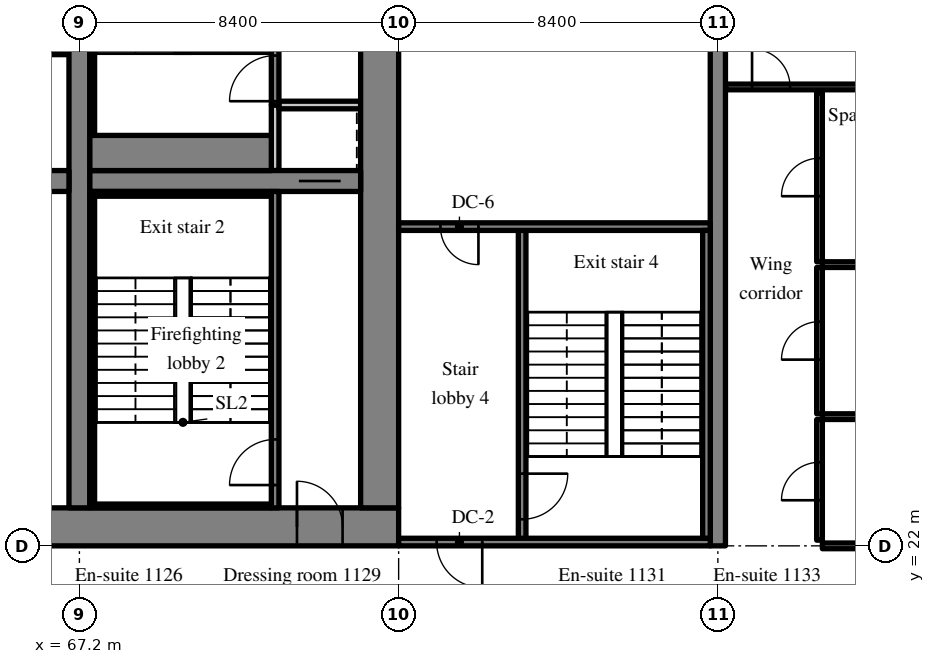
"""IFC4 building model, lengths in metres.
Left out: names, types, materials, properties, quantities, classifications, styles, units other than length and angle.
Written with IfcOpenShell. Run it as: python <this file> out.ifc"""

import sys

from ifc_helpers import new_model, si_unit, direction, frame, frame_2d, origin, place, context, subcontext, project, spatial, rectangle, extrude, source, transform, mapped, element, fill, save


model = new_model("IFC4")
c1 = context("Model", 3, precision=1e-05, world=origin(), true_north=direction((0.0, 1.0)))
c2 = subcontext(c1, "Body", "Model", "MODEL_VIEW")
j1 = project(units=[si_unit("LENGTHUNIT", "METRE"), si_unit("PLANEANGLEUNIT", "RADIAN")], contexts=[c1])
p1 = place(None, origin())
s1 = spatial("IfcSite", under=j1, at=p1, CompositionType="ELEMENT")
p2 = place(p1, origin())
s2 = spatial("IfcBuilding", under=s1, at=p2, CompositionType="ELEMENT")
p3 = place(p2, frame((0.0, 0.0, 50.6)))
s3 = spatial("IfcBuildingStorey", under=s2, at=p3, CompositionType="ELEMENT", Elevation=50.6)
m1 = source(origin(), c2, "Body", "SweptSolid", [
    extrude(rectangle(XDim=50.4, YDim=1.0, at=frame_2d((25.2, 0.0))), origin(), (0.0, 0.0, 1.0), 3.52),
])
p4 = place(p3, frame((25.2, 22.5, 0.0), z_axis=(0.0, 0.0, 1.0), x_axis=(1.0, 0.0, 0.0)))
e1 = element("IfcWall", 1, at=p4, inside=s3, PredefinedType="SHEAR", context=c2, shape_type="MappedRepresentation", body=[
    mapped(m1, transform((0.0, 0.0, 0.0), scale=1.0)),
])
m2 = source(origin(), c2, "Body", "SweptSolid", [
    extrude(rectangle(XDim=1.8, YDim=2.1, at=frame_2d((0.9, 1.05))), frame((0.0, 0.51, 0.0), z_axis=(0.0, -1.0, 0.0), x_axis=(1.0, 0.0, 0.0)), (0.0, 0.0, 1.0), 1.02),
])
p5 = place(p4, frame((15.9, 0.0, 0.0)))
e2 = element("IfcOpeningElement", 2, at=p5, cuts=e1, PredefinedType="OPENING", context=c2, shape_type="MappedRepresentation", body=[
    mapped(m2, transform((0.0, 0.0, 0.0), scale=1.0)),
])
m3 = source(origin(), c2, "Body", "SweptSolid", [
    extrude(rectangle(XDim=1.2, YDim=2.1, at=frame_2d((0.6, 1.05))), frame((0.0, 0.51, 0.0), z_axis=(0.0, -1.0, 0.0), x_axis=(1.0, 0.0, 0.0)), (0.0, 0.0, 1.0), 1.02),
])
p6 = place(p4, frame((26.987, 0.0, 0.0)))
e3 = element("IfcOpeningElement", 3, at=p6, cuts=e1, PredefinedType="OPENING", context=c2, shape_type="MappedRepresentation", body=[
    mapped(m3, transform((0.0, 0.0, 0.0), scale=1.0)),
])
m4 = source(origin(), c2, "Body", "SweptSolid", [
    extrude(rectangle(XDim=0.9, YDim=2.1, at=frame_2d((0.45, 1.05))), frame((0.0, 0.51, 0.0), z_axis=(0.0, -1.0, 0.0), x_axis=(1.0, 0.0, 0.0)), (0.0, 0.0, 1.0), 1.02),
])
p7 = place(p4, frame((33.75, 0.0, 0.0)))
e4 = element("IfcOpeningElement", 4, at=p7, cuts=e1, PredefinedType="OPENING", context=c2, shape_type="MappedRepresentation", body=[
    mapped(m4, transform((0.0, 0.0, 0.0), scale=1.0)),
])
p8 = place(p4, frame((30.75, 0.0, 0.0)))
e5 = element("IfcOpeningElement", 5, at=p8, cuts=e1, PredefinedType="OPENING", context=c2, shape_type="MappedRepresentation", body=[
    mapped(m4, transform((0.0, 0.0, 0.0), scale=1.0)),
])
p9 = place(p4, frame((38.262, 0.0, 0.0)))
e6 = element("IfcOpeningElement", 6, at=p9, cuts=e1, PredefinedType="OPENING", context=c2, shape_type="MappedRepresentation", body=[
    mapped(m4, transform((0.0, 0.0, 0.0), scale=1.0)),
])
p10 = place(p4, frame((6.438, 0.0, 0.0)))
e7 = element("IfcOpeningElement", 7, at=p10, cuts=e1, PredefinedType="OPENING", context=c2, shape_type="MappedRepresentation", body=[
    mapped(m3, transform((0.0, 0.0, 0.0), scale=1.0)),
])
p11 = place(p4, frame((47.725, 0.0, 0.0)))
e8 = element("IfcOpeningElement", 8, at=p11, cuts=e1, PredefinedType="OPENING", context=c2, shape_type="MappedRepresentation", body=[
    mapped(m3, transform((0.0, 0.0, 0.0), scale=1.0)),
])
m5 = source(origin(), c2, "Body", "SweptSolid", [
    extrude(rectangle(XDim=18.0, YDim=1.0, at=frame_2d((9.0, 0.0))), origin(), (0.0, 0.0, 1.0), 3.52),
])
p12 = place(p3, frame((75.1, 23.0, 0.0), z_axis=(0.0, 0.0, 1.0), x_axis=(0.0, 1.0, 0.0)))
e9 = element("IfcWall", 9, at=p12, inside=s3, PredefinedType="SHEAR", context=c2, shape_type="MappedRepresentation", body=[
    mapped(m5, transform((0.0, 0.0, 0.0), scale=1.0)),
])
p13 = place(p12, frame((12.4, 0.0, 0.0)))
e10 = element("IfcOpeningElement", 10, at=p13, cuts=e9, PredefinedType="OPENING", context=c2, shape_type="MappedRepresentation", body=[
    mapped(m3, transform((0.0, 0.0, 0.0), scale=1.0)),
])
m6 = source(origin(), c2, "Body", "SweptSolid", [
    extrude(rectangle(XDim=18.0, YDim=0.55, at=frame_2d((9.0, 0.0))), origin(), (0.0, 0.0, 1.0), 3.52),
])
p14 = place(p3, frame((67.2, 23.0, 0.0), z_axis=(0.0, 0.0, 1.0), x_axis=(0.0, 1.0, 0.0)))
e11 = element("IfcWall", 11, at=p14, inside=s3, PredefinedType="SHEAR", context=c2, shape_type="MappedRepresentation", body=[
    mapped(m6, transform((0.0, 0.0, 0.0), scale=1.0)),
])
m7 = source(origin(), c2, "Body", "SweptSolid", [
    extrude(rectangle(XDim=16.25, YDim=0.55, at=frame_2d((8.125, 0.0))), origin(), (0.0, 0.0, 1.0), 3.52),
])
p15 = place(p3, frame((50.675, 31.6, 0.0), z_axis=(0.0, 0.0, 1.0), x_axis=(1.0, 0.0, 0.0)))
e12 = element("IfcWall", 12, at=p15, inside=s3, PredefinedType="SHEAR", context=c2, shape_type="MappedRepresentation", body=[
    mapped(m7, transform((0.0, 0.0, 0.0), scale=1.0)),
])
m8 = source(origin(), c2, "Body", "SweptSolid", [
    extrude(rectangle(XDim=1.0, YDim=2.1, at=frame_2d((0.5, 1.05))), frame((0.0, 0.285, 0.0), z_axis=(0.0, -1.0, 0.0), x_axis=(1.0, 0.0, 0.0)), (0.0, 0.0, 1.0), 0.57),
])
p16 = place(p15, frame((0.562, 0.0, 0.0)))
e13 = element("IfcOpeningElement", 13, at=p16, cuts=e12, PredefinedType="OPENING", context=c2, shape_type="MappedRepresentation", body=[
    mapped(m8, transform((0.0, 0.0, 0.0), scale=1.0)),
])
m9 = source(origin(), c2, "Body", "SweptSolid", [
    extrude(rectangle(XDim=7.125, YDim=0.55, at=frame_2d((3.562, 0.0))), origin(), (0.0, 0.0, 1.0), 3.52),
])
p17 = place(p3, frame((67.475, 31.6, 0.0), z_axis=(0.0, 0.0, 1.0), x_axis=(1.0, 0.0, 0.0)))
e14 = element("IfcWall", 14, at=p17, inside=s3, PredefinedType="SHEAR", context=c2, shape_type="MappedRepresentation", body=[
    mapped(m9, transform((0.0, 0.0, 0.0), scale=1.0)),
])
m10 = source(origin(), c2, "Body", "SweptSolid", [
    extrude(rectangle(XDim=1.1, YDim=2.1, at=frame_2d((0.55, 1.05))), frame((0.0, 0.285, 0.0), z_axis=(0.0, -1.0, 0.0), x_axis=(1.0, 0.0, 0.0)), (0.0, 0.0, 1.0), 0.57),
])
p18 = place(p17, frame((5.5, 0.0, 0.0)))
e15 = element("IfcOpeningElement", 15, at=p18, cuts=e14, PredefinedType="OPENING", context=c2, shape_type="MappedRepresentation", body=[
    mapped(m10, transform((0.0, 0.0, 0.0), scale=1.0)),
])
m11 = source(origin(), c2, "Body", "SweptSolid", [
    extrude(rectangle(XDim=20.0, YDim=0.4, at=frame_2d((10.0, 0.0))), origin(), (0.0, 0.0, 1.0), 3.52),
])
p19 = place(p3, frame((84.0, 22.0, 0.0), z_axis=(0.0, 0.0, 1.0), x_axis=(0.0, 1.0, 0.0)))
e16 = element("IfcWall", 16, at=p19, inside=s3, PredefinedType="SHEAR", context=c2, shape_type="MappedRepresentation", body=[
    mapped(m11, transform((0.0, 0.0, 0.0), scale=1.0)),
])
m12 = source(origin(), c2, "Body", "SweptSolid", [
    extrude(rectangle(XDim=14.125, YDim=0.15, at=frame_2d((7.062, 0.0))), origin(), (0.0, 0.0, 1.0), 3.52),
])
p20 = place(p3, frame((66.925, 35.0, 0.0), z_axis=(0.0, 0.0, 1.0), x_axis=(-1.0, 0.0, 0.0)))
e17 = element("IfcWall", 17, at=p20, inside=s3, PredefinedType="PARTITIONING", context=c2, shape_type="MappedRepresentation", body=[
    mapped(m12, transform((0.0, 0.0, 0.0), scale=1.0)),
])
m13 = source(origin(), c2, "Body", "SweptSolid", [
    extrude(rectangle(XDim=0.9, YDim=2.1, at=frame_2d((0.45, 1.05))), frame((0.0, 0.085, 0.0), z_axis=(0.0, -1.0, 0.0), x_axis=(1.0, 0.0, 0.0)), (0.0, 0.0, 1.0), 0.17),
])
p21 = place(p20, frame((3.414, 0.0, 0.0)))
e18 = element("IfcOpeningElement", 18, at=p21, cuts=e17, PredefinedType="OPENING", context=c2, shape_type="MappedRepresentation", body=[
    mapped(m13, transform((0.0, 0.0, 0.0), scale=1.0)),
])
p22 = place(p20, frame((10.439, 0.0, 0.0)))
e19 = element("IfcOpeningElement", 19, at=p22, cuts=e17, PredefinedType="OPENING", context=c2, shape_type="MappedRepresentation", body=[
    mapped(m13, transform((0.0, 0.0, 0.0), scale=1.0)),
])
m14 = source(origin(), c2, "Body", "SweptSolid", [
    extrude(rectangle(XDim=8.325, YDim=0.2, at=frame_2d((4.163, 0.0))), origin(), (0.0, 0.0, 1.0), 3.52),
])
p23 = place(p3, frame((72.35, 23.0, 0.0), z_axis=(0.0, 0.0, 1.0), x_axis=(0.0, 1.0, 0.0)))
e20 = element("IfcWall", 20, at=p23, inside=s3, PredefinedType="SOLIDWALL", context=c2, shape_type="MappedRepresentation", body=[
    mapped(m14, transform((0.0, 0.0, 0.0), scale=1.0)),
])
m15 = source(origin(), c2, "Body", "SweptSolid", [
    extrude(rectangle(XDim=1.2, YDim=2.1, at=frame_2d((0.6, 1.05))), frame((0.0, 0.11, 0.0), z_axis=(0.0, -1.0, 0.0), x_axis=(1.0, 0.0, 0.0)), (0.0, 0.0, 1.0), 0.22),
])
p24 = place(p23, frame((0.6, 0.0, 0.0)))
e21 = element("IfcOpeningElement", 21, at=p24, cuts=e20, PredefinedType="OPENING", context=c2, shape_type="MappedRepresentation", body=[
    mapped(m15, transform((0.0, 0.0, 0.0), scale=1.0)),
])
m16 = source(origin(), c2, "Body", "SweptSolid", [
    extrude(rectangle(XDim=1.725, YDim=0.2, at=frame_2d((0.863, 0.0))), origin(), (0.0, 0.0, 1.0), 3.52),
])
p25 = place(p3, frame((72.35, 31.875, 0.0), z_axis=(0.0, 0.0, 1.0), x_axis=(0.0, 1.0, 0.0)))
e22 = element("IfcWall", 22, at=p25, inside=s3, PredefinedType="SOLIDWALL", context=c2, shape_type="MappedRepresentation", body=[
    mapped(m16, transform((0.0, 0.0, 0.0), scale=1.0)),
])
m17 = source(origin(), c2, "Body", "SweptSolid", [
    extrude(rectangle(XDim=2.15, YDim=0.2, at=frame_2d((1.075, 0.0))), origin(), (0.0, 0.0, 1.0), 3.52),
])
p26 = place(p3, frame((72.45, 33.6, 0.0), z_axis=(0.0, 0.0, 1.0), x_axis=(1.0, 0.0, 0.0)))
e23 = element("IfcWall", 23, at=p26, inside=s3, PredefinedType="SOLIDWALL", context=c2, shape_type="MappedRepresentation", body=[
    mapped(m17, transform((0.0, 0.0, 0.0), scale=1.0)),
])
m18 = source(origin(), c2, "Body", "SweptSolid", [
    extrude(rectangle(XDim=7.4, YDim=0.2, at=frame_2d((3.7, 0.0))), origin(), (0.0, 0.0, 1.0), 3.52),
])
p27 = place(p3, frame((72.35, 33.6, 0.0), z_axis=(0.0, 0.0, 1.0), x_axis=(0.0, 1.0, 0.0)))
e24 = element("IfcWall", 24, at=p27, inside=s3, PredefinedType="SOLIDWALL", context=c2, shape_type="MappedRepresentation", body=[
    mapped(m18, transform((0.0, 0.0, 0.0), scale=1.0)),
])
p28 = place(p27, frame((0.1, 0.0, 0.0)))
e25 = element("IfcOpeningElement", 25, at=p28, cuts=e24, PredefinedType="OPENING", context=c2, shape_type="MappedRepresentation", body=[
    mapped(m15, transform((0.0, 0.0, 0.0), scale=1.0)),
])
m19 = source(origin(), c2, "Body", "SweptSolid", [
    extrude(rectangle(XDim=8.3, YDim=0.2, at=frame_2d((4.15, 0.0))), origin(), (0.0, 0.0, 1.0), 3.52),
])
p29 = place(p3, frame((78.85, 22.1, 0.0), z_axis=(0.0, 0.0, 1.0), x_axis=(0.0, 1.0, 0.0)))
e26 = element("IfcWall", 26, at=p29, inside=s3, PredefinedType="SOLIDWALL", context=c2, shape_type="MappedRepresentation", body=[
    mapped(m19, transform((0.0, 0.0, 0.0), scale=1.0)),
])
p30 = place(p29, frame((0.6, 0.0, 0.0)))
e27 = element("IfcOpeningElement", 27, at=p30, cuts=e26, PredefinedType="OPENING", context=c2, shape_type="MappedRepresentation", body=[
    mapped(m15, transform((0.0, 0.0, 0.0), scale=1.0)),
])
m20 = source(origin(), c2, "Body", "SweptSolid", [
    extrude(rectangle(XDim=8.2, YDim=0.2, at=frame_2d((4.1, 0.0))), origin(), (0.0, 0.0, 1.0), 3.52),
])
p31 = place(p3, frame((83.8, 22.1, 0.0), z_axis=(0.0, 0.0, 1.0), x_axis=(-1.0, 0.0, 0.0)))
e28 = element("IfcWall", 28, at=p31, inside=s3, PredefinedType="SOLIDWALL", context=c2, shape_type="MappedRepresentation", body=[
    mapped(m20, transform((0.0, 0.0, 0.0), scale=1.0)),
])
p32 = place(p31, frame((6.0, 0.0, 0.0)))
e29 = element("IfcOpeningElement", 29, at=p32, cuts=e28, PredefinedType="OPENING", context=c2, shape_type="MappedRepresentation", body=[
    mapped(m15, transform((0.0, 0.0, 0.0), scale=1.0)),
])
p33 = place(p3, frame((83.8, 30.4, 0.0), z_axis=(0.0, 0.0, 1.0), x_axis=(-1.0, 0.0, 0.0)))
e30 = element("IfcWall", 30, at=p33, inside=s3, PredefinedType="SOLIDWALL", context=c2, shape_type="MappedRepresentation", body=[
    mapped(m20, transform((0.0, 0.0, 0.0), scale=1.0)),
])
m21 = source(origin(), c2, "Body", "SweptSolid", [
    extrude(rectangle(XDim=1.0, YDim=2.1, at=frame_2d((0.5, 1.05))), frame((0.0, 0.11, 0.0), z_axis=(0.0, -1.0, 0.0), x_axis=(1.0, 0.0, 0.0)), (0.0, 0.0, 1.0), 0.22),
])
p34 = place(p33, frame((6.1, 0.0, 0.0)))
e31 = element("IfcOpeningElement", 31, at=p34, cuts=e30, PredefinedType="OPENING", context=c2, shape_type="MappedRepresentation", body=[
    mapped(m21, transform((0.0, 0.0, 0.0), scale=1.0)),
])
m22 = source(origin(), c2, "Body", "SweptSolid", [
    extrude(rectangle(XDim=4.775, YDim=0.1, at=frame_2d((2.387, 0.0))), origin(), (0.0, 0.0, 1.0), 3.52),
])
p35 = place(p3, frame((67.475, 23.05, 0.0), z_axis=(0.0, 0.0, 1.0), x_axis=(1.0, 0.0, 0.0)))
e32 = element("IfcWall", 32, at=p35, inside=s3, PredefinedType="SOLIDWALL", context=c2, shape_type="MappedRepresentation", body=[
    mapped(m22, transform((0.0, 0.0, 0.0), scale=1.0)),
])
m23 = source(origin(), c2, "Body", "SweptSolid", [
    extrude(rectangle(XDim=4.775, YDim=0.125, at=frame_2d((2.387, 0.0))), origin(), (0.0, 0.0, 1.0), 3.52),
])
p36 = place(p3, frame((67.475, 31.262, 0.0), z_axis=(0.0, 0.0, 1.0), x_axis=(1.0, 0.0, 0.0)))
e33 = element("IfcWall", 33, at=p36, inside=s3, PredefinedType="SOLIDWALL", context=c2, shape_type="MappedRepresentation", body=[
    mapped(m23, transform((0.0, 0.0, 0.0), scale=1.0)),
])
m24 = source(origin(), c2, "Body", "SweptSolid", [
    extrude(rectangle(XDim=8.1, YDim=0.125, at=frame_2d((4.05, 0.0))), origin(), (0.0, 0.0, 1.0), 3.52),
])
p37 = place(p3, frame((67.537, 23.1, 0.0), z_axis=(0.0, 0.0, 1.0), x_axis=(0.0, 1.0, 0.0)))
e34 = element("IfcWall", 34, at=p37, inside=s3, PredefinedType="SOLIDWALL", context=c2, shape_type="MappedRepresentation", body=[
    mapped(m24, transform((0.0, 0.0, 0.0), scale=1.0)),
])
m25 = source(origin(), c2, "Body", "SweptSolid", [
    extrude(rectangle(XDim=4.775, YDim=0.925, at=frame_2d((2.387, 0.0))), origin(), (0.0, 0.0, 1.0), 3.52),
])
p38 = place(p3, frame((67.475, 32.337, 0.0), z_axis=(0.0, 0.0, 1.0), x_axis=(1.0, 0.0, 0.0)))
e35 = element("IfcWall", 35, at=p38, inside=s3, PredefinedType="SOLIDWALL", context=c2, shape_type="MappedRepresentation", body=[
    mapped(m25, transform((0.0, 0.0, 0.0), scale=1.0)),
])
p39 = place(p3, frame((67.537, 32.8, 0.0), z_axis=(0.0, 0.0, 1.0), x_axis=(0.0, 1.0, 0.0)))
e36 = element("IfcWall", 36, at=p39, inside=s3, PredefinedType="SOLIDWALL", context=c2, shape_type="MappedRepresentation", body=[
    mapped(m24, transform((0.0, 0.0, 0.0), scale=1.0)),
])
m26 = source(origin(), c2, "Body", "SweptSolid", [
    extrude(rectangle(XDim=8.1, YDim=0.2, at=frame_2d((4.05, 0.0))), origin(), (0.0, 0.0, 1.0), 3.52),
])
p40 = place(p3, frame((83.7, 22.2, 0.0), z_axis=(0.0, 0.0, 1.0), x_axis=(0.0, 1.0, 0.0)))
e37 = element("IfcWall", 37, at=p40, inside=s3, PredefinedType="SOLIDWALL", context=c2, shape_type="MappedRepresentation", body=[
    mapped(m26, transform((0.0, 0.0, 0.0), scale=1.0)),
])
m27 = source(origin(), c2, "Body", "SweptSolid", [
    extrude(rectangle(XDim=5.45, YDim=0.15, at=frame_2d((2.725, 0.0))), origin(), (0.0, 0.0, 1.0), 2.82),
])
p41 = place(p3, frame((86.75, 22.0, 0.0), z_axis=(0.0, 0.0, 1.0), x_axis=(1.0, 0.0, 0.0)))
e38 = element("IfcWall", 38, at=p41, inside=s3, PredefinedType="PARTITIONING", context=c2, shape_type="MappedRepresentation", body=[
    mapped(m27, transform((0.0, 0.0, 0.0), scale=1.0)),
])
m28 = source(origin(), c2, "Body", "SweptSolid", [
    extrude(rectangle(XDim=3.175, YDim=0.15, at=frame_2d((1.587, 0.0))), origin(), (0.0, 0.0, 1.0), 3.52),
])
p42 = place(p3, frame((86.675, 22.15, 0.0), z_axis=(0.0, 0.0, 1.0), x_axis=(0.0, 1.0, 0.0)))
e39 = element("IfcWall", 39, at=p42, inside=s3, PredefinedType="PARTITIONING", context=c2, shape_type="MappedRepresentation", body=[
    mapped(m28, transform((0.0, 0.0, 0.0), scale=1.0)),
])
m29 = source(origin(), c2, "Body", "SweptSolid", [
    extrude(rectangle(XDim=1.0, YDim=2.1, at=frame_2d((0.5, 1.05))), frame((0.0, 0.085, 0.0), z_axis=(0.0, -1.0, 0.0), x_axis=(1.0, 0.0, 0.0)), (0.0, 0.0, 1.0), 0.17),
])
p43 = place(p42, frame((1.05, 0.0, 0.0)))
e40 = element("IfcOpeningElement", 40, at=p43, cuts=e39, PredefinedType="OPENING", context=c2, shape_type="MappedRepresentation", body=[
    mapped(m29, transform((0.0, 0.0, 0.0), scale=1.0)),
])
m30 = source(origin(), c2, "Body", "SweptSolid", [
    extrude(rectangle(XDim=5.45, YDim=0.15, at=frame_2d((2.725, 0.0))), origin(), (0.0, 0.0, 1.0), 3.52),
])
p44 = place(p3, frame((86.75, 25.4, 0.0), z_axis=(0.0, 0.0, 1.0), x_axis=(1.0, 0.0, 0.0)))
e41 = element("IfcWall", 41, at=p44, inside=s3, PredefinedType="PARTITIONING", context=c2, shape_type="MappedRepresentation", body=[
    mapped(m30, transform((0.0, 0.0, 0.0), scale=1.0)),
])
m31 = source(origin(), c2, "Body", "SweptSolid", [
    extrude(rectangle(XDim=3.85, YDim=0.15, at=frame_2d((1.925, 0.0))), origin(), (0.0, 0.0, 1.0), 3.52),
])
p45 = place(p3, frame((86.675, 25.475, 0.0), z_axis=(0.0, 0.0, 1.0), x_axis=(0.0, 1.0, 0.0)))
e42 = element("IfcWall", 42, at=p45, inside=s3, PredefinedType="PARTITIONING", context=c2, shape_type="MappedRepresentation", body=[
    mapped(m31, transform((0.0, 0.0, 0.0), scale=1.0)),
])
p46 = place(p45, frame((1.425, 0.0, 0.0)))
e43 = element("IfcOpeningElement", 43, at=p46, cuts=e42, PredefinedType="OPENING", context=c2, shape_type="MappedRepresentation", body=[
    mapped(m29, transform((0.0, 0.0, 0.0), scale=1.0)),
])
p47 = place(p3, frame((86.75, 29.4, 0.0), z_axis=(0.0, 0.0, 1.0), x_axis=(1.0, 0.0, 0.0)))
e44 = element("IfcWall", 44, at=p47, inside=s3, PredefinedType="PARTITIONING", context=c2, shape_type="MappedRepresentation", body=[
    mapped(m30, transform((0.0, 0.0, 0.0), scale=1.0)),
])
m32 = source(origin(), c2, "Body", "SweptSolid", [
    extrude(rectangle(XDim=4.45, YDim=0.15, at=frame_2d((2.225, 0.0))), origin(), (0.0, 0.0, 1.0), 3.52),
])
p48 = place(p3, frame((86.675, 29.475, 0.0), z_axis=(0.0, 0.0, 1.0), x_axis=(0.0, 1.0, 0.0)))
e45 = element("IfcWall", 45, at=p48, inside=s3, PredefinedType="PARTITIONING", context=c2, shape_type="MappedRepresentation", body=[
    mapped(m32, transform((0.0, 0.0, 0.0), scale=1.0)),
])
p49 = place(p48, frame((1.725, 0.0, 0.0)))
e46 = element("IfcOpeningElement", 46, at=p49, cuts=e45, PredefinedType="OPENING", context=c2, shape_type="MappedRepresentation", body=[
    mapped(m29, transform((0.0, 0.0, 0.0), scale=1.0)),
])
m33 = source(origin(), c2, "Body", "SweptSolid", [
    extrude(rectangle(XDim=8.0, YDim=0.15, at=frame_2d((4.0, 0.0))), origin(), (0.0, 0.0, 1.0), 3.52),
])
p50 = place(p3, frame((84.2, 34.075, 0.0), z_axis=(0.0, 0.0, 1.0), x_axis=(1.0, 0.0, 0.0)))
e47 = element("IfcWall", 47, at=p50, inside=s3, PredefinedType="PARTITIONING", context=c2, shape_type="MappedRepresentation", body=[
    mapped(m33, transform((0.0, 0.0, 0.0), scale=1.0)),
])
p51 = place(p50, frame((0.7, 0.0, 0.0)))
e48 = element("IfcOpeningElement", 48, at=p51, cuts=e47, PredefinedType="OPENING", context=c2, shape_type="MappedRepresentation", body=[
    mapped(m29, transform((0.0, 0.0, 0.0), scale=1.0)),
])
m34 = source(origin(), c2, "Body", "SweptSolid", [
    extrude(rectangle(XDim=1.2, YDim=2.1, at=frame_2d((0.6, 1.05))), frame((0.0, 0.025, 0.0), z_axis=(0.0, -1.0, 0.0), x_axis=(1.0, 0.0, 0.0)), (0.0, 0.0, 1.0), 0.05),
])
p52 = place(p24, origin())
e49 = element("IfcDoor", 49, at=p52, inside=s3, OperationType="SINGLE_SWING_LEFT", PredefinedType="DOOR", context=c2, shape_type="MappedRepresentation", body=[
    mapped(m34, transform((0.0, 0.0, 0.0), scale=1.0)),
])
fill(e21, e49)
m35 = source(origin(), c2, "Body", "SweptSolid", [
    extrude(rectangle(XDim=1.2, YDim=2.1, at=frame_2d((0.6, 1.05))), frame((0.0, 0.375, 0.0), z_axis=(0.0, -1.0, 0.0), x_axis=(1.0, 0.0, 0.0)), (0.0, 0.0, 1.0), 0.05),
])
p53 = place(p11, origin())
e50 = element("IfcDoor", 50, at=p53, inside=s3, OperationType="SINGLE_SWING_LEFT", PredefinedType="DOOR", context=c2, shape_type="MappedRepresentation", body=[
    mapped(m35, transform((0.0, 0.0, 0.0), scale=1.0)),
])
fill(e8, e50)
m36 = source(origin(), c2, "Body", "SweptSolid", [
    extrude(rectangle(XDim=1.1, YDim=2.1, at=frame_2d((0.55, 1.05))), frame((0.0, 0.025, 0.0), z_axis=(0.0, -1.0, 0.0), x_axis=(1.0, 0.0, 0.0)), (0.0, 0.0, 1.0), 0.05),
])
p54 = place(p18, origin())
e51 = element("IfcDoor", 51, at=p54, inside=s3, OperationType="SLIDING_TO_LEFT", PredefinedType="DOOR", context=c2, shape_type="MappedRepresentation", body=[
    mapped(m36, transform((0.0, 0.0, 0.0), scale=1.0)),
])
fill(e15, e51)
p55 = place(p28, origin())
e52 = element("IfcDoor", 52, at=p55, inside=s3, OperationType="SINGLE_SWING_LEFT", PredefinedType="DOOR", context=c2, shape_type="MappedRepresentation", body=[
    mapped(m34, transform((0.0, 0.0, 0.0), scale=1.0)),
])
fill(e25, e52)
p56 = place(p30, origin())
e53 = element("IfcDoor", 53, at=p56, inside=s3, OperationType="SINGLE_SWING_RIGHT", PredefinedType="DOOR", context=c2, shape_type="MappedRepresentation", body=[
    mapped(m34, transform((0.0, 0.0, 0.0), scale=1.0)),
])
fill(e27, e53)
p57 = place(p32, origin())
e54 = element("IfcDoor", 54, at=p57, inside=s3, OperationType="SINGLE_SWING_LEFT", PredefinedType="DOOR", context=c2, shape_type="MappedRepresentation", body=[
    mapped(m34, transform((0.0, 0.0, 0.0), scale=1.0)),
])
fill(e29, e54)
m37 = source(origin(), c2, "Body", "SweptSolid", [
    extrude(rectangle(XDim=1.0, YDim=2.1, at=frame_2d((0.5, 1.05))), frame((0.0, 0.025, 0.0), z_axis=(0.0, -1.0, 0.0), x_axis=(1.0, 0.0, 0.0)), (0.0, 0.0, 1.0), 0.05),
])
p58 = place(p34, origin())
e55 = element("IfcDoor", 55, at=p58, inside=s3, OperationType="SINGLE_SWING_LEFT", PredefinedType="DOOR", context=c2, shape_type="MappedRepresentation", body=[
    mapped(m37, transform((0.0, 0.0, 0.0), scale=1.0)),
])
fill(e31, e55)
p59 = place(p43, origin())
e56 = element("IfcDoor", 56, at=p59, inside=s3, OperationType="SINGLE_SWING_LEFT", PredefinedType="DOOR", context=c2, shape_type="MappedRepresentation", body=[
    mapped(m37, transform((0.0, 0.0, 0.0), scale=1.0)),
])
fill(e40, e56)
p60 = place(p46, origin())
e57 = element("IfcDoor", 57, at=p60, inside=s3, OperationType="SINGLE_SWING_LEFT", PredefinedType="DOOR", context=c2, shape_type="MappedRepresentation", body=[
    mapped(m37, transform((0.0, 0.0, 0.0), scale=1.0)),
])
fill(e43, e57)
p61 = place(p49, origin())
e58 = element("IfcDoor", 58, at=p61, inside=s3, OperationType="SINGLE_SWING_LEFT", PredefinedType="DOOR", context=c2, shape_type="MappedRepresentation", body=[
    mapped(m37, transform((0.0, 0.0, 0.0), scale=1.0)),
])
fill(e46, e58)
p62 = place(p51, origin())
e59 = element("IfcDoor", 59, at=p62, inside=s3, OperationType="SINGLE_SWING_LEFT", PredefinedType="DOOR", context=c2, shape_type="MappedRepresentation", body=[
    mapped(m37, transform((0.0, 0.0, 0.0), scale=1.0)),
])
fill(e48, e59)
save(model, sys.argv[1])
